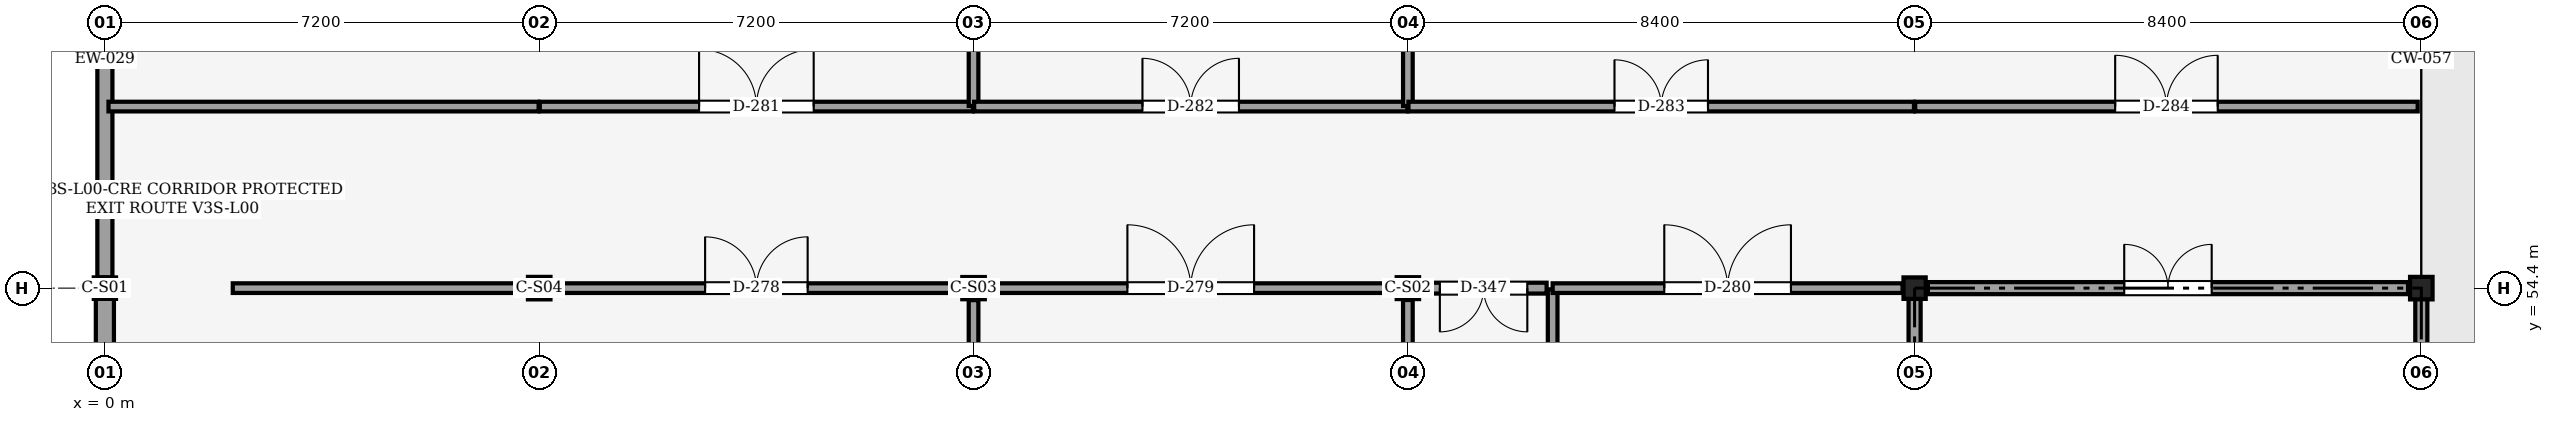
"""IFC4 building model, lengths in metres.
Left out: names, types, materials, properties, quantities, classifications, styles, units other than length and angle.
Written with IfcOpenShell. Run it as: python <this file> out.ifc"""

import sys

from ifc_helpers import new_model, si_unit, direction, frame, frame_2d, origin, origin_2d, place, context, subcontext, project, spatial, rectangle, i_section, extrude, element, fill, save


model = new_model("IFC4")
c1 = context("Model", 3, precision=1e-05, world=origin(), true_north=direction((0.0, 1.0)))
c2 = subcontext(c1, "Body", "Model", "MODEL_VIEW")
j1 = project(units=[si_unit("LENGTHUNIT", "METRE"), si_unit("PLANEANGLEUNIT", "RADIAN")], contexts=[c1])
p1 = place(None, origin())
s1 = spatial("IfcSite", under=j1, at=p1, CompositionType="ELEMENT")
p2 = place(p1, origin())
s2 = spatial("IfcBuilding", under=s1, at=p2, CompositionType="ELEMENT")
p3 = place(p2, origin())
s3 = spatial("IfcBuildingStorey", under=s2, at=p3, CompositionType="ELEMENT", Elevation=0.0)
p4 = place(p3, frame((0.0, 54.4, 0.0), z_axis=(0.0, 0.0, 1.0), x_axis=(1.0, 0.0, 0.0)))
e1 = element("IfcColumn", 1, at=p4, inside=s3, PredefinedType="COLUMN", context=c2, shape_type="SweptSolid", body=[
    extrude(i_section(OverallWidth=0.368, OverallDepth=0.356, WebThickness=0.011, FlangeThickness=0.018, FilletRadius=0.025, at=origin_2d()), origin(), (0.0, 0.0, 1.0), 5.4),
])
p5 = place(p3, frame((7.2, 54.4, 0.0), z_axis=(0.0, 0.0, 1.0), x_axis=(1.0, 0.0, 0.0)))
e2 = element("IfcColumn", 2, at=p5, inside=s3, PredefinedType="COLUMN", context=c2, shape_type="SweptSolid", body=[
    extrude(i_section(OverallWidth=0.373, OverallDepth=0.373, WebThickness=0.016, FlangeThickness=0.026, FilletRadius=0.025, at=origin_2d()), origin(), (0.0, 0.0, 1.0), 5.4),
])
p6 = place(p3, frame((14.4, 54.4, 0.0), z_axis=(0.0, 0.0, 1.0), x_axis=(1.0, 0.0, 0.0)))
e3 = element("IfcColumn", 3, at=p6, inside=s3, PredefinedType="COLUMN", context=c2, shape_type="SweptSolid", body=[
    extrude(i_section(OverallWidth=0.373, OverallDepth=0.368, WebThickness=0.015, FlangeThickness=0.024, FilletRadius=0.025, at=origin_2d()), origin(), (0.0, 0.0, 1.0), 5.4),
])
p7 = place(p3, frame((21.6, 54.4, 0.0), z_axis=(0.0, 0.0, 1.0), x_axis=(1.0, 0.0, 0.0)))
e4 = element("IfcColumn", 4, at=p7, inside=s3, PredefinedType="COLUMN", context=c2, shape_type="SweptSolid", body=[
    extrude(i_section(OverallWidth=0.371, OverallDepth=0.363, WebThickness=0.013, FlangeThickness=0.022, FilletRadius=0.025, at=origin_2d()), origin(), (0.0, 0.0, 1.0), 5.4),
])
p8 = place(p3, frame((30.0, 54.4, 0.0), z_axis=(0.0, 0.0, 1.0), x_axis=(1.0, 0.0, 0.0)))
e5 = element("IfcColumn", 5, at=p8, inside=s3, PredefinedType="COLUMN", context=c2, shape_type="SweptSolid", body=[
    extrude(i_section(OverallWidth=0.368, OverallDepth=0.356, WebThickness=0.011, FlangeThickness=0.018, FilletRadius=0.025, at=origin_2d()), origin(), (0.0, 0.0, 1.0), 5.4),
])
p9 = place(p3, frame((38.4, 54.4, 0.0), z_axis=(0.0, 0.0, 1.0), x_axis=(1.0, 0.0, 0.0)))
e6 = element("IfcColumn", 6, at=p9, inside=s3, PredefinedType="COLUMN", context=c2, shape_type="SweptSolid", body=[
    extrude(i_section(OverallWidth=0.373, OverallDepth=0.373, WebThickness=0.016, FlangeThickness=0.026, FilletRadius=0.025, at=origin_2d()), origin(), (0.0, 0.0, 1.0), 5.4),
])
p10 = place(p3, frame((0.0, 46.987, 0.0), z_axis=(0.0, 0.0, 1.0), x_axis=(0.0, 1.0, 0.0)))
e7 = element("IfcWall", 7, at=p10, inside=s3, PredefinedType="SOLIDWALL", context=c2, shape_type="SweptSolid", body=[
    extrude(rectangle(XDim=7.235, YDim=0.3, at=frame_2d((3.618, 0.0))), origin(), (0.0, 0.0, 1.0), 4.528),
])
p11 = place(p10, frame((0.75, 0.0, 0.9)))
e8 = element("IfcOpeningElement", 8, at=p11, cuts=e7, PredefinedType="OPENING", context=c2, shape_type="SweptSolid", body=[
    extrude(rectangle(XDim=1.2, YDim=1.5, at=frame_2d((0.6, 0.75))), frame((0.0, 0.16, 0.0), z_axis=(0.0, -1.0, 0.0), x_axis=(1.0, 0.0, 0.0)), (0.0, 0.0, 1.0), 0.321),
])
p12 = place(p3, frame((0.0, 54.578, 0.0), z_axis=(0.0, 0.0, 1.0), x_axis=(0.0, 1.0, 0.0)))
e9 = element("IfcWall", 9, at=p12, inside=s3, PredefinedType="SOLIDWALL", context=c2, shape_type="SweptSolid", body=[
    extrude(rectangle(XDim=7.241, YDim=0.25, at=frame_2d((3.62, 0.0))), origin(), (0.0, 0.0, 1.0), 4.533),
])
p13 = place(p3, frame((30.0, 51.12, 0.0), z_axis=(0.0, 0.0, 1.0), x_axis=(0.0, 1.0, 0.0)))
e10 = element("IfcWall", 10, at=p13, inside=s3, PredefinedType="PARTITIONING", context=c2, shape_type="SweptSolid", body=[
    extrude(rectangle(XDim=3.26, YDim=0.2, at=frame_2d((1.63, 0.0))), origin(), (0.0, 0.0, 1.0), 4.528),
])
p14 = place(p3, frame((38.4, 51.12, 0.0), z_axis=(0.0, 0.0, 1.0), x_axis=(0.0, 1.0, 0.0)))
e11 = element("IfcWall", 11, at=p14, inside=s3, PredefinedType="PARTITIONING", context=c2, shape_type="SweptSolid", body=[
    extrude(rectangle(XDim=3.26, YDim=0.2, at=frame_2d((1.63, 0.0))), origin(), (0.0, 0.0, 1.0), 4.533),
])
p15 = place(p3, frame((30.22, 54.4, 0.0), z_axis=(0.0, 0.0, 1.0), x_axis=(1.0, 0.0, 0.0)))
e12 = element("IfcWall", 12, at=p15, inside=s3, PredefinedType="PARTITIONING", context=c2, shape_type="SweptSolid", body=[
    extrude(rectangle(XDim=7.96, YDim=0.2, at=frame_2d((3.98, 0.0))), origin(), (0.0, 0.0, 1.0), 4.518),
])
p16 = place(p15, frame((3.255, 0.0, 0.0)))
e13 = element("IfcOpeningElement", 13, at=p16, cuts=e12, PredefinedType="OPENING", context=c2, shape_type="SweptSolid", body=[
    extrude(rectangle(XDim=1.45, YDim=2.2, at=frame_2d((0.725, 1.1))), frame((0.0, 0.11, 0.0), z_axis=(0.0, -1.0, 0.0), x_axis=(1.0, 0.0, 0.0)), (0.0, 0.0, 1.0), 0.22),
])
p17 = place(p3, frame((2.12, 54.4, 0.0), z_axis=(0.0, 0.0, 1.0), x_axis=(1.0, 0.0, 0.0)))
e14 = element("IfcWall", 14, at=p17, inside=s3, PredefinedType="PARTITIONING", context=c2, shape_type="SweptSolid", body=[
    extrude(rectangle(XDim=4.878, YDim=0.16, at=frame_2d((2.439, 0.0))), origin(), (0.0, 0.0, 1.0), 4.591),
])
p18 = place(p3, frame((7.402, 54.4, 0.0), z_axis=(0.0, 0.0, 1.0), x_axis=(1.0, 0.0, 0.0)))
e15 = element("IfcWall", 15, at=p18, inside=s3, PredefinedType="PARTITIONING", context=c2, shape_type="SweptSolid", body=[
    extrude(rectangle(XDim=6.797, YDim=0.16, at=frame_2d((3.398, 0.0))), origin(), (0.0, 0.0, 1.0), 4.607),
])
p19 = place(p18, frame((2.549, 0.0, 0.0)))
e16 = element("IfcOpeningElement", 16, at=p19, cuts=e15, PredefinedType="OPENING", context=c2, shape_type="SweptSolid", body=[
    extrude(rectangle(XDim=1.7, YDim=2.4, at=frame_2d((0.85, 1.2))), frame((0.0, 0.09, 0.0), z_axis=(0.0, -1.0, 0.0), x_axis=(1.0, 0.0, 0.0)), (0.0, 0.0, 1.0), 0.18),
])
p20 = place(p3, frame((14.4, 46.997, 0.0), z_axis=(0.0, 0.0, 1.0), x_axis=(0.0, 1.0, 0.0)))
e17 = element("IfcWall", 17, at=p20, inside=s3, PredefinedType="PARTITIONING", context=c2, shape_type="SweptSolid", body=[
    extrude(rectangle(XDim=7.204, YDim=0.16, at=frame_2d((3.602, 0.0))), origin(), (0.0, 0.0, 1.0), 4.607),
])
p21 = place(p3, frame((14.602, 54.4, 0.0), z_axis=(0.0, 0.0, 1.0), x_axis=(1.0, 0.0, 0.0)))
e18 = element("IfcWall", 18, at=p21, inside=s3, PredefinedType="PARTITIONING", context=c2, shape_type="SweptSolid", body=[
    extrude(rectangle(XDim=6.798, YDim=0.16, at=frame_2d((3.399, 0.0))), origin(), (0.0, 0.0, 1.0), 4.678),
])
p22 = place(p21, frame((2.349, 0.0, 0.0)))
e19 = element("IfcOpeningElement", 19, at=p22, cuts=e18, PredefinedType="OPENING", context=c2, shape_type="SweptSolid", body=[
    extrude(rectangle(XDim=2.1, YDim=2.5, at=frame_2d((1.05, 1.25))), frame((0.0, 0.09, 0.0), z_axis=(0.0, -1.0, 0.0), x_axis=(1.0, 0.0, 0.0)), (0.0, 0.0, 1.0), 0.18),
])
p23 = place(p3, frame((21.6, 47.012, 0.0), z_axis=(0.0, 0.0, 1.0), x_axis=(0.0, 1.0, 0.0)))
e20 = element("IfcWall", 20, at=p23, inside=s3, PredefinedType="PARTITIONING", context=c2, shape_type="SweptSolid", body=[
    extrude(rectangle(XDim=7.192, YDim=0.16, at=frame_2d((3.596, 0.0))), origin(), (0.0, 0.0, 1.0), 4.678),
])
p24 = place(p3, frame((24.0, 46.84, 0.0), z_axis=(0.0, 0.0, 1.0), x_axis=(0.0, 1.0, 0.0)))
e21 = element("IfcWall", 21, at=p24, inside=s3, PredefinedType="PARTITIONING", context=c2, shape_type="SweptSolid", body=[
    extrude(rectangle(XDim=7.54, YDim=0.16, at=frame_2d((3.77, 0.0))), origin(), (0.0, 0.0, 1.0), 5.14),
])
p25 = place(p3, frame((24.0, 54.4, 0.0), z_axis=(0.0, 0.0, 1.0), x_axis=(1.0, 0.0, 0.0)))
e22 = element("IfcWall", 22, at=p25, inside=s3, PredefinedType="PARTITIONING", context=c2, shape_type="SweptSolid", body=[
    extrude(rectangle(XDim=5.801, YDim=0.16, at=frame_2d((2.9, 0.0))), origin(), (0.0, 0.0, 1.0), 4.447),
])
p26 = place(p25, frame((1.851, 0.0, 0.0)))
e23 = element("IfcOpeningElement", 23, at=p26, cuts=e22, PredefinedType="OPENING", context=c2, shape_type="SweptSolid", body=[
    extrude(rectangle(XDim=2.1, YDim=2.5, at=frame_2d((1.05, 1.25))), frame((0.0, 0.09, 0.0), z_axis=(0.0, -1.0, 0.0), x_axis=(1.0, 0.0, 0.0)), (0.0, 0.0, 1.0), 0.18),
])
p27 = place(p3, frame((0.06, 57.41, 0.0), z_axis=(0.0, 0.0, 1.0), x_axis=(1.0, 0.0, 0.0)))
e24 = element("IfcWall", 24, at=p27, inside=s3, PredefinedType="PARTITIONING", context=c2, shape_type="SweptSolid", body=[
    extrude(rectangle(XDim=7.13, YDim=0.16, at=frame_2d((3.565, 0.0))), origin(), (0.0, 0.0, 1.0), 5.14),
])
p28 = place(p3, frame((7.21, 57.41, 0.0), z_axis=(0.0, 0.0, 1.0), x_axis=(1.0, 0.0, 0.0)))
e25 = element("IfcWall", 25, at=p28, inside=s3, PredefinedType="PARTITIONING", context=c2, shape_type="SweptSolid", body=[
    extrude(rectangle(XDim=7.18, YDim=0.16, at=frame_2d((3.59, 0.0))), origin(), (0.0, 0.0, 1.0), 5.14),
])
p29 = place(p28, frame((2.64, 0.0, 0.0)))
e26 = element("IfcOpeningElement", 26, at=p29, cuts=e25, PredefinedType="OPENING", context=c2, shape_type="SweptSolid", body=[
    extrude(rectangle(XDim=1.9, YDim=2.45, at=frame_2d((0.95, 1.225))), frame((0.0, 0.09, 0.0), z_axis=(0.0, -1.0, 0.0), x_axis=(1.0, 0.0, 0.0)), (0.0, 0.0, 1.0), 0.18),
])
p30 = place(p3, frame((14.4, 57.42, 0.0), z_axis=(0.0, 0.0, 1.0), x_axis=(0.0, 1.0, 0.0)))
e27 = element("IfcWall", 27, at=p30, inside=s3, PredefinedType="PARTITIONING", context=c2, shape_type="SweptSolid", body=[
    extrude(rectangle(XDim=4.379, YDim=0.16, at=frame_2d((2.189, 0.0))), origin(), (0.0, 0.0, 1.0), 4.678),
])
p31 = place(p3, frame((14.41, 57.41, 0.0), z_axis=(0.0, 0.0, 1.0), x_axis=(1.0, 0.0, 0.0)))
e28 = element("IfcWall", 28, at=p31, inside=s3, PredefinedType="PARTITIONING", context=c2, shape_type="SweptSolid", body=[
    extrude(rectangle(XDim=7.18, YDim=0.16, at=frame_2d((3.59, 0.0))), origin(), (0.0, 0.0, 1.0), 5.14),
])
p32 = place(p31, frame((2.79, 0.0, 0.0)))
e29 = element("IfcOpeningElement", 29, at=p32, cuts=e28, PredefinedType="OPENING", context=c2, shape_type="SweptSolid", body=[
    extrude(rectangle(XDim=1.6, YDim=2.35, at=frame_2d((0.8, 1.175))), frame((0.0, 0.09, 0.0), z_axis=(0.0, -1.0, 0.0), x_axis=(1.0, 0.0, 0.0)), (0.0, 0.0, 1.0), 0.18),
])
p33 = place(p3, frame((21.6, 57.42, 0.0), z_axis=(0.0, 0.0, 1.0), x_axis=(0.0, 1.0, 0.0)))
e30 = element("IfcWall", 30, at=p33, inside=s3, PredefinedType="PARTITIONING", context=c2, shape_type="SweptSolid", body=[
    extrude(rectangle(XDim=4.381, YDim=0.16, at=frame_2d((2.19, 0.0))), origin(), (0.0, 0.0, 1.0), 4.528),
])
p34 = place(p3, frame((21.61, 57.41, 0.0), z_axis=(0.0, 0.0, 1.0), x_axis=(1.0, 0.0, 0.0)))
e31 = element("IfcWall", 31, at=p34, inside=s3, PredefinedType="PARTITIONING", context=c2, shape_type="SweptSolid", body=[
    extrude(rectangle(XDim=8.38, YDim=0.16, at=frame_2d((4.19, 0.0))), origin(), (0.0, 0.0, 1.0), 5.14),
])
p35 = place(p34, frame((3.415, 0.0, 0.0)))
e32 = element("IfcOpeningElement", 32, at=p35, cuts=e31, PredefinedType="OPENING", context=c2, shape_type="SweptSolid", body=[
    extrude(rectangle(XDim=1.55, YDim=2.3, at=frame_2d((0.775, 1.15))), frame((0.0, 0.09, 0.0), z_axis=(0.0, -1.0, 0.0), x_axis=(1.0, 0.0, 0.0)), (0.0, 0.0, 1.0), 0.18),
])
p36 = place(p3, frame((30.01, 57.41, 0.0), z_axis=(0.0, 0.0, 1.0), x_axis=(1.0, 0.0, 0.0)))
e33 = element("IfcWall", 33, at=p36, inside=s3, PredefinedType="PARTITIONING", context=c2, shape_type="SweptSolid", body=[
    extrude(rectangle(XDim=8.33, YDim=0.16, at=frame_2d((4.165, 0.0))), origin(), (0.0, 0.0, 1.0), 5.14),
])
p37 = place(p36, frame((3.315, 0.0, 0.0)))
e34 = element("IfcOpeningElement", 34, at=p37, cuts=e33, PredefinedType="OPENING", context=c2, shape_type="SweptSolid", body=[
    extrude(rectangle(XDim=1.7, YDim=2.4, at=frame_2d((0.85, 1.2))), frame((0.0, 0.09, 0.0), z_axis=(0.0, -1.0, 0.0), x_axis=(1.0, 0.0, 0.0)), (0.0, 0.0, 1.0), 0.18),
])
p38 = place(p3, frame((23.9, 54.4, 0.0), z_axis=(0.0, 0.0, 1.0), x_axis=(-1.0, 0.0, 0.0)))
e35 = element("IfcWall", 35, at=p38, inside=s3, PredefinedType="PARTITIONING", context=c2, shape_type="SweptSolid", body=[
    extrude(rectangle(XDim=2.09, YDim=0.18, at=frame_2d((1.045, 0.0))), origin(), (0.0, 0.0, 1.0), 4.447),
])
p39 = place(p38, frame((0.32, 0.0, 0.0)))
e36 = element("IfcOpeningElement", 36, at=p39, cuts=e35, PredefinedType="OPENING", context=c2, shape_type="SweptSolid", body=[
    extrude(rectangle(XDim=1.45, YDim=2.2, at=frame_2d((0.725, 1.1))), frame((0.0, 0.1, 0.0), z_axis=(0.0, -1.0, 0.0), x_axis=(1.0, 0.0, 0.0)), (0.0, 0.0, 1.0), 0.2),
])
p40 = place(p16, origin())
e37 = element("IfcDoor", 37, at=p40, inside=s3, OperationType="DOUBLE_DOOR_SINGLE_SWING", PredefinedType="DOOR", context=c2, shape_type="SweptSolid", body=[
    extrude(rectangle(XDim=1.45, YDim=2.2, at=frame_2d((0.725, 1.1))), frame((0.0, 0.025, 0.0), z_axis=(0.0, -1.0, 0.0), x_axis=(1.0, 0.0, 0.0)), (0.0, 0.0, 1.0), 0.05),
])
fill(e13, e37)
p41 = place(p19, origin())
e38 = element("IfcDoor", 38, at=p41, inside=s3, OperationType="DOUBLE_DOOR_SINGLE_SWING", PredefinedType="DOOR", context=c2, shape_type="SweptSolid", body=[
    extrude(rectangle(XDim=1.7, YDim=2.4, at=frame_2d((0.85, 1.2))), frame((0.0, 0.025, 0.0), z_axis=(0.0, -1.0, 0.0), x_axis=(1.0, 0.0, 0.0)), (0.0, 0.0, 1.0), 0.05),
])
fill(e16, e38)
p42 = place(p22, origin())
e39 = element("IfcDoor", 39, at=p42, inside=s3, OperationType="DOUBLE_DOOR_SINGLE_SWING", PredefinedType="DOOR", context=c2, shape_type="SweptSolid", body=[
    extrude(rectangle(XDim=2.1, YDim=2.5, at=frame_2d((1.05, 1.25))), frame((0.0, 0.025, 0.0), z_axis=(0.0, -1.0, 0.0), x_axis=(1.0, 0.0, 0.0)), (0.0, 0.0, 1.0), 0.05),
])
fill(e19, e39)
p43 = place(p26, origin())
e40 = element("IfcDoor", 40, at=p43, inside=s3, OperationType="DOUBLE_DOOR_SINGLE_SWING", PredefinedType="DOOR", context=c2, shape_type="SweptSolid", body=[
    extrude(rectangle(XDim=2.1, YDim=2.5, at=frame_2d((1.05, 1.25))), frame((0.0, 0.025, 0.0), z_axis=(0.0, -1.0, 0.0), x_axis=(1.0, 0.0, 0.0)), (0.0, 0.0, 1.0), 0.05),
])
fill(e23, e40)
p44 = place(p29, origin())
e41 = element("IfcDoor", 41, at=p44, inside=s3, OperationType="DOUBLE_DOOR_SINGLE_SWING", PredefinedType="DOOR", context=c2, shape_type="SweptSolid", body=[
    extrude(rectangle(XDim=1.9, YDim=2.45, at=frame_2d((0.95, 1.225))), frame((0.0, 0.025, 0.0), z_axis=(0.0, -1.0, 0.0), x_axis=(1.0, 0.0, 0.0)), (0.0, 0.0, 1.0), 0.05),
])
fill(e26, e41)
p45 = place(p32, origin())
e42 = element("IfcDoor", 42, at=p45, inside=s3, OperationType="DOUBLE_DOOR_SINGLE_SWING", PredefinedType="DOOR", context=c2, shape_type="SweptSolid", body=[
    extrude(rectangle(XDim=1.6, YDim=2.35, at=frame_2d((0.8, 1.175))), frame((0.0, 0.025, 0.0), z_axis=(0.0, -1.0, 0.0), x_axis=(1.0, 0.0, 0.0)), (0.0, 0.0, 1.0), 0.05),
])
fill(e29, e42)
p46 = place(p35, origin())
e43 = element("IfcDoor", 43, at=p46, inside=s3, OperationType="DOUBLE_DOOR_SINGLE_SWING", PredefinedType="DOOR", context=c2, shape_type="SweptSolid", body=[
    extrude(rectangle(XDim=1.55, YDim=2.3, at=frame_2d((0.775, 1.15))), frame((0.0, 0.025, 0.0), z_axis=(0.0, -1.0, 0.0), x_axis=(1.0, 0.0, 0.0)), (0.0, 0.0, 1.0), 0.05),
])
fill(e32, e43)
p47 = place(p37, origin())
e44 = element("IfcDoor", 44, at=p47, inside=s3, OperationType="DOUBLE_DOOR_SINGLE_SWING", PredefinedType="DOOR", context=c2, shape_type="SweptSolid", body=[
    extrude(rectangle(XDim=1.7, YDim=2.4, at=frame_2d((0.85, 1.2))), frame((0.0, 0.025, 0.0), z_axis=(0.0, -1.0, 0.0), x_axis=(1.0, 0.0, 0.0)), (0.0, 0.0, 1.0), 0.05),
])
fill(e34, e44)
p48 = place(p39, origin())
e45 = element("IfcDoor", 45, at=p48, inside=s3, OperationType="DOUBLE_DOOR_SINGLE_SWING", PredefinedType="DOOR", context=c2, shape_type="SweptSolid", body=[
    extrude(rectangle(XDim=1.45, YDim=2.2, at=frame_2d((0.725, 1.1))), frame((0.0, 0.025, 0.0), z_axis=(0.0, -1.0, 0.0), x_axis=(1.0, 0.0, 0.0)), (0.0, 0.0, 1.0), 0.05),
])
fill(e36, e45)
save(model, sys.argv[1])
